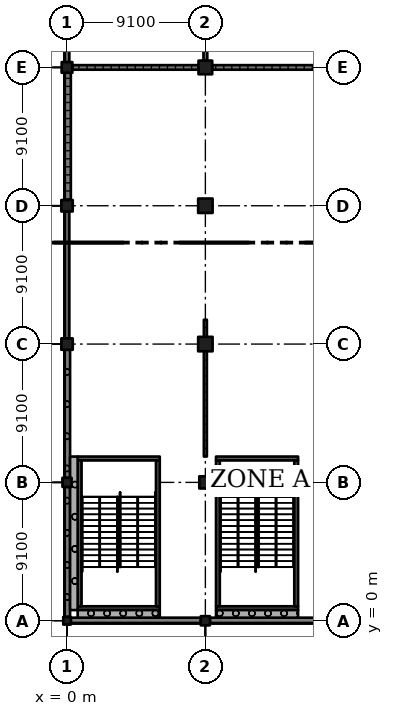
"""IFC4 building model, lengths in metres.
Left out: names, types, materials, properties, quantities, classifications, styles, units other than length and angle.
Written with IfcOpenShell. Run it as: python <this file> out.ifc"""

import sys

from ifc_helpers import new_model, si_unit, direction, frame, frame_2d, origin, origin_2d, place, context, subcontext, project, spatial, rectangle, extrude, element, fill, save


model = new_model("IFC4")
c1 = context("Model", 3, precision=1e-05, world=origin(), true_north=direction((0.0, 1.0)))
c2 = subcontext(c1, "Body", "Model", "MODEL_VIEW")
j1 = project(units=[si_unit("LENGTHUNIT", "METRE"), si_unit("PLANEANGLEUNIT", "RADIAN")], contexts=[c1])
p1 = place(None, origin())
s1 = spatial("IfcSite", under=j1, at=p1, CompositionType="ELEMENT")
p2 = place(p1, origin())
s2 = spatial("IfcBuilding", under=s1, at=p2, CompositionType="ELEMENT")
p3 = place(p2, origin())
s3 = spatial("IfcBuildingStorey", under=s2, at=p3, CompositionType="ELEMENT", Elevation=0.0)
p4 = place(p3, frame((0.0, 0.0, -0.4), z_axis=(0.0, 0.0, 1.0), x_axis=(1.0, 0.0, 0.0)))
e1 = element("IfcColumn", 1, at=p4, inside=s3, PredefinedType="COLUMN", context=c2, shape_type="SweptSolid", body=[
    extrude(rectangle(XDim=0.5, YDim=0.5, at=origin_2d()), origin(), (0.0, 0.0, 1.0), 6.77),
])
p5 = place(p3, frame((0.0, 9.1, -0.4), z_axis=(0.0, 0.0, 1.0), x_axis=(1.0, 0.0, 0.0)))
e2 = element("IfcColumn", 2, at=p5, inside=s3, PredefinedType="COLUMN", context=c2, shape_type="SweptSolid", body=[
    extrude(rectangle(XDim=0.6, YDim=0.6, at=origin_2d()), origin(), (0.0, 0.0, 1.0), 6.77),
])
for number, where, z_axis, x_axis in (
    (3, (0.0, 18.2, -0.4), (0.0, 0.0, 1.0), (1.0, 0.0, 0.0)),
    (4, (0.0, 27.3, -0.4), (0.0, 0.0, 1.0), (1.0, 0.0, 0.0)),
):
    element("IfcColumn", number, at=place(p3, frame(where, z_axis=z_axis, x_axis=x_axis)), inside=s3, PredefinedType="COLUMN", context=c2, shape_type="SweptSolid", body=[
        extrude(rectangle(XDim=0.75, YDim=0.75, at=origin_2d()), origin(), (0.0, 0.0, 1.0), 6.77),
    ])
p6 = place(p3, frame((0.0, 36.4, -0.4), z_axis=(0.0, 0.0, 1.0), x_axis=(1.0, 0.0, 0.0)))
e5 = element("IfcColumn", 5, at=p6, inside=s3, PredefinedType="COLUMN", context=c2, shape_type="SweptSolid", body=[
    extrude(rectangle(XDim=0.7, YDim=0.7, at=origin_2d()), origin(), (0.0, 0.0, 1.0), 6.77),
])
p7 = place(p3, frame((9.1, 0.0, -0.4), z_axis=(0.0, 0.0, 1.0), x_axis=(1.0, 0.0, 0.0)))
e6 = element("IfcColumn", 6, at=p7, inside=s3, PredefinedType="COLUMN", context=c2, shape_type="SweptSolid", body=[
    extrude(rectangle(XDim=0.6, YDim=0.6, at=origin_2d()), origin(), (0.0, 0.0, 1.0), 6.77),
])
p8 = place(p3, frame((9.1, 9.1, -0.4), z_axis=(0.0, 0.0, 1.0), x_axis=(1.0, 0.0, 0.0)))
e7 = element("IfcColumn", 7, at=p8, inside=s3, PredefinedType="COLUMN", context=c2, shape_type="SweptSolid", body=[
    extrude(rectangle(XDim=0.8, YDim=0.8, at=origin_2d()), origin(), (0.0, 0.0, 1.0), 6.77),
])
for number, where, z_axis, x_axis in (
    (8, (9.1, 18.2, -0.4), (0.0, 0.0, 1.0), (1.0, 0.0, 0.0)),
    (9, (9.1, 27.3, -0.4), (0.0, 0.0, 1.0), (1.0, 0.0, 0.0)),
):
    element("IfcColumn", number, at=place(p3, frame(where, z_axis=z_axis, x_axis=x_axis)), inside=s3, PredefinedType="COLUMN", context=c2, shape_type="SweptSolid", body=[
        extrude(rectangle(XDim=0.95, YDim=0.95, at=origin_2d()), origin(), (0.0, 0.0, 1.0), 6.77),
    ])
p9 = place(p3, frame((9.1, 36.4, -0.4), z_axis=(0.0, 0.0, 1.0), x_axis=(1.0, 0.0, 0.0)))
e10 = element("IfcColumn", 10, at=p9, inside=s3, PredefinedType="COLUMN", context=c2, shape_type="SweptSolid", body=[
    extrude(rectangle(XDim=0.9, YDim=0.9, at=origin_2d()), origin(), (0.0, 0.0, 1.0), 6.77),
])
p10 = place(p3, frame((6.1, 0.825, -0.4), z_axis=(0.0, 0.0, 1.0), x_axis=(-1.0, 0.0, 0.0)))
e11 = element("IfcWall", 11, at=p10, inside=s3, PredefinedType="SHEAR", context=c2, shape_type="SweptSolid", body=[
    extrude(rectangle(XDim=5.4, YDim=0.25, at=frame_2d((2.7, 0.0))), origin(), (0.0, 0.0, 1.0), 6.77),
])
p11 = place(p3, frame((6.1, 10.675, -0.4), z_axis=(0.0, 0.0, 1.0), x_axis=(-1.0, 0.0, 0.0)))
e12 = element("IfcWall", 12, at=p11, inside=s3, PredefinedType="SHEAR", context=c2, shape_type="SweptSolid", body=[
    extrude(rectangle(XDim=5.4, YDim=0.25, at=frame_2d((2.7, 0.0))), origin(), (0.0, 0.0, 1.0), 6.77),
])
p12 = place(p11, frame((1.5, 0.0, 0.4)))
e13 = element("IfcOpeningElement", 13, at=p12, cuts=e12, PredefinedType="OPENING", context=c2, shape_type="SweptSolid", body=[
    extrude(rectangle(XDim=2.4, YDim=2.1, at=frame_2d((1.2, 1.05))), frame((0.0, 0.135, 0.0), z_axis=(0.0, -1.0, 0.0), x_axis=(1.0, 0.0, 0.0)), (0.0, 0.0, 1.0), 0.27),
])
p13 = place(p3, frame((0.825, 10.55, -0.4), z_axis=(0.0, 0.0, 1.0), x_axis=(0.0, -1.0, 0.0)))
e14 = element("IfcWall", 14, at=p13, inside=s3, PredefinedType="SHEAR", context=c2, shape_type="SweptSolid", body=[
    extrude(rectangle(XDim=9.6, YDim=0.25, at=frame_2d((4.8, 0.0))), origin(), (0.0, 0.0, 1.0), 6.77),
])
p14 = place(p3, frame((5.975, 10.55, -0.4), z_axis=(0.0, 0.0, 1.0), x_axis=(0.0, -1.0, 0.0)))
e15 = element("IfcWall", 15, at=p14, inside=s3, PredefinedType="SHEAR", context=c2, shape_type="SweptSolid", body=[
    extrude(rectangle(XDim=9.6, YDim=0.25, at=frame_2d((4.8, 0.0))), origin(), (0.0, 0.0, 1.0), 6.77),
])
p15 = place(p14, frame((0.45, 0.0, 0.4)))
e16 = element("IfcOpeningElement", 16, at=p15, cuts=e15, PredefinedType="OPENING", context=c2, shape_type="SweptSolid", body=[
    extrude(rectangle(XDim=1.2, YDim=2.1, at=frame_2d((0.6, 1.05))), frame((0.0, 0.135, 0.0), z_axis=(0.0, -1.0, 0.0), x_axis=(1.0, 0.0, 0.0)), (0.0, 0.0, 1.0), 0.27),
])
p16 = place(p3, frame((15.2, 0.825, -0.4), z_axis=(0.0, 0.0, 1.0), x_axis=(-1.0, 0.0, 0.0)))
e17 = element("IfcWall", 17, at=p16, inside=s3, PredefinedType="SHEAR", context=c2, shape_type="SweptSolid", body=[
    extrude(rectangle(XDim=5.4, YDim=0.25, at=frame_2d((2.7, 0.0))), origin(), (0.0, 0.0, 1.0), 6.77),
])
p17 = place(p3, frame((15.2, 10.675, -0.4), z_axis=(0.0, 0.0, 1.0), x_axis=(-1.0, 0.0, 0.0)))
e18 = element("IfcWall", 18, at=p17, inside=s3, PredefinedType="SHEAR", context=c2, shape_type="SweptSolid", body=[
    extrude(rectangle(XDim=5.4, YDim=0.25, at=frame_2d((2.7, 0.0))), origin(), (0.0, 0.0, 1.0), 6.77),
])
p18 = place(p17, frame((1.5, 0.0, 0.4)))
e19 = element("IfcOpeningElement", 19, at=p18, cuts=e18, PredefinedType="OPENING", context=c2, shape_type="SweptSolid", body=[
    extrude(rectangle(XDim=2.4, YDim=2.1, at=frame_2d((1.2, 1.05))), frame((0.0, 0.135, 0.0), z_axis=(0.0, -1.0, 0.0), x_axis=(1.0, 0.0, 0.0)), (0.0, 0.0, 1.0), 0.27),
])
p19 = place(p3, frame((9.925, 10.55, -0.4), z_axis=(0.0, 0.0, 1.0), x_axis=(0.0, -1.0, 0.0)))
e20 = element("IfcWall", 20, at=p19, inside=s3, PredefinedType="SHEAR", context=c2, shape_type="SweptSolid", body=[
    extrude(rectangle(XDim=9.6, YDim=0.25, at=frame_2d((4.8, 0.0))), origin(), (0.0, 0.0, 1.0), 6.77),
])
p20 = place(p3, frame((15.075, 10.55, -0.4), z_axis=(0.0, 0.0, 1.0), x_axis=(0.0, -1.0, 0.0)))
e21 = element("IfcWall", 21, at=p20, inside=s3, PredefinedType="SHEAR", context=c2, shape_type="SweptSolid", body=[
    extrude(rectangle(XDim=9.6, YDim=0.25, at=frame_2d((4.8, 0.0))), origin(), (0.0, 0.0, 1.0), 6.77),
])
p21 = place(p20, frame((0.45, 0.0, 0.4)))
e22 = element("IfcOpeningElement", 22, at=p21, cuts=e21, PredefinedType="OPENING", context=c2, shape_type="SweptSolid", body=[
    extrude(rectangle(XDim=1.2, YDim=2.1, at=frame_2d((0.6, 1.05))), frame((0.0, 0.135, 0.0), z_axis=(0.0, -1.0, 0.0), x_axis=(1.0, 0.0, 0.0)), (0.0, 0.0, 1.0), 0.27),
])
p22 = place(p3, frame((0.25, 0.025, 0.0), z_axis=(0.0, 0.0, 1.0), x_axis=(1.0, 0.0, 0.0)))
e23 = element("IfcWall", 23, at=p22, inside=s3, PredefinedType="SOLIDWALL", context=c2, shape_type="SweptSolid", body=[
    extrude(rectangle(XDim=8.55, YDim=0.35, at=frame_2d((4.275, 0.0))), origin(), (0.0, 0.0, 1.0), 5.27),
])
p23 = place(p22, frame((6.15, 0.0, 0.0)))
e24 = element("IfcOpeningElement", 24, at=p23, cuts=e23, PredefinedType="OPENING", context=c2, shape_type="SweptSolid", body=[
    extrude(rectangle(XDim=1.8, YDim=2.4, at=frame_2d((0.9, 1.2))), frame((0.0, 0.185, 0.0), z_axis=(0.0, -1.0, 0.0), x_axis=(1.0, 0.0, 0.0)), (0.0, 0.0, 1.0), 0.37),
])
p24 = place(p3, frame((9.4, 0.025, 0.0), z_axis=(0.0, 0.0, 1.0), x_axis=(1.0, 0.0, 0.0)))
e25 = element("IfcWall", 25, at=p24, inside=s3, PredefinedType="SOLIDWALL", context=c2, shape_type="SweptSolid", body=[
    extrude(rectangle(XDim=8.5, YDim=0.35, at=frame_2d((4.25, 0.0))), origin(), (0.0, 0.0, 1.0), 5.27),
])
p25 = place(p24, frame((5.95, 0.0, 0.0)))
e26 = element("IfcOpeningElement", 26, at=p25, cuts=e25, PredefinedType="OPENING", context=c2, shape_type="SweptSolid", body=[
    extrude(rectangle(XDim=2.1, YDim=2.4, at=frame_2d((1.05, 1.2))), frame((0.0, 0.185, 0.0), z_axis=(0.0, -1.0, 0.0), x_axis=(1.0, 0.0, 0.0)), (0.0, 0.0, 1.0), 0.37),
])
p26 = place(p3, frame((0.0, 45.175, 0.0), z_axis=(0.0, 0.0, 1.0), x_axis=(0.0, -1.0, 0.0)))
e27 = element("IfcWall", 27, at=p26, inside=s3, PredefinedType="SOLIDWALL", context=c2, shape_type="SweptSolid", body=[
    extrude(rectangle(XDim=8.425, YDim=0.3, at=frame_2d((4.212, 0.0))), origin(), (0.0, 0.0, 1.0), 5.27),
])
p27 = place(p3, frame((0.05, 36.05, 0.0), z_axis=(0.0, 0.0, 1.0), x_axis=(0.0, -1.0, 0.0)))
e28 = element("IfcWall", 28, at=p27, inside=s3, PredefinedType="SOLIDWALL", context=c2, shape_type="SweptSolid", body=[
    extrude(rectangle(XDim=8.375, YDim=0.4, at=frame_2d((4.188, 0.0))), origin(), (0.0, 0.0, 1.0), 5.32),
])
p28 = place(p27, frame((1.95, 0.0, 0.0)))
e29 = element("IfcOpeningElement", 29, at=p28, cuts=e28, PredefinedType="OPENING", context=c2, shape_type="SweptSolid", body=[
    extrude(rectangle(XDim=4.5, YDim=4.8, at=frame_2d((2.25, 2.4))), frame((0.0, 0.21, 0.0), z_axis=(0.0, -1.0, 0.0), x_axis=(1.0, 0.0, 0.0)), (0.0, 0.0, 1.0), 0.42),
])
p29 = place(p27, frame((0.475, 0.0, 0.0)))
e30 = element("IfcOpeningElement", 30, at=p29, cuts=e28, PredefinedType="OPENING", context=c2, shape_type="SweptSolid", body=[
    extrude(rectangle(XDim=1.0, YDim=2.1, at=frame_2d((0.5, 1.05))), frame((0.0, 0.21, 0.0), z_axis=(0.0, -1.0, 0.0), x_axis=(1.0, 0.0, 0.0)), (0.0, 0.0, 1.0), 0.42),
])
p30 = place(p3, frame((0.0, 26.925, 0.0), z_axis=(0.0, 0.0, 1.0), x_axis=(0.0, -1.0, 0.0)))
e31 = element("IfcWall", 31, at=p30, inside=s3, PredefinedType="SOLIDWALL", context=c2, shape_type="SweptSolid", body=[
    extrude(rectangle(XDim=8.35, YDim=0.3, at=frame_2d((4.175, 0.0))), origin(), (0.0, 0.0, 1.0), 5.32),
])
p31 = place(p3, frame((0.025, 17.825, 0.0), z_axis=(0.0, 0.0, 1.0), x_axis=(0.0, -1.0, 0.0)))
e32 = element("IfcWall", 32, at=p31, inside=s3, PredefinedType="SOLIDWALL", context=c2, shape_type="SweptSolid", body=[
    extrude(rectangle(XDim=8.425, YDim=0.35, at=frame_2d((4.212, 0.0))), origin(), (0.0, 0.0, 1.0), 5.27),
])
p32 = place(p31, frame((4.425, 0.0, 0.0)))
e33 = element("IfcOpeningElement", 33, at=p32, cuts=e32, PredefinedType="OPENING", context=c2, shape_type="SweptSolid", body=[
    extrude(rectangle(XDim=2.4, YDim=2.4, at=frame_2d((1.2, 1.2))), frame((0.0, 0.185, 0.0), z_axis=(0.0, -1.0, 0.0), x_axis=(1.0, 0.0, 0.0)), (0.0, 0.0, 1.0), 0.37),
])
p33 = place(p31, frame((1.425, 0.0, 0.0)))
e34 = element("IfcOpeningElement", 34, at=p33, cuts=e32, PredefinedType="OPENING", context=c2, shape_type="SweptSolid", body=[
    extrude(rectangle(XDim=2.4, YDim=2.4, at=frame_2d((1.2, 1.2))), frame((0.0, 0.185, 0.0), z_axis=(0.0, -1.0, 0.0), x_axis=(1.0, 0.0, 0.0)), (0.0, 0.0, 1.0), 0.37),
])
p34 = place(p3, frame((0.025, 8.8, 0.0), z_axis=(0.0, 0.0, 1.0), x_axis=(0.0, -1.0, 0.0)))
e35 = element("IfcWall", 35, at=p34, inside=s3, PredefinedType="SOLIDWALL", context=c2, shape_type="SweptSolid", body=[
    extrude(rectangle(XDim=8.55, YDim=0.35, at=frame_2d((4.275, 0.0))), origin(), (0.0, 0.0, 1.0), 5.27),
])
p35 = place(p3, frame((0.7, 0.45, 0.0), z_axis=(0.0, 0.0, 1.0), x_axis=(1.0, 0.0, 0.0)))
e36 = element("IfcWall", 36, at=p35, inside=s3, PredefinedType="SOLIDWALL", context=c2, shape_type="SweptSolid", body=[
    extrude(rectangle(XDim=5.4, YDim=0.5, at=frame_2d((2.7, 0.0))), origin(), (0.0, 0.0, 1.0), 6.37),
])
p36 = place(p3, frame((0.45, 0.7, 0.0), z_axis=(0.0, 0.0, 1.0), x_axis=(0.0, 1.0, 0.0)))
e37 = element("IfcWall", 37, at=p36, inside=s3, PredefinedType="SOLIDWALL", context=c2, shape_type="SweptSolid", body=[
    extrude(rectangle(XDim=10.1, YDim=0.5, at=frame_2d((5.05, 0.0))), origin(), (0.0, 0.0, 1.0), 6.02),
])
p37 = place(p3, frame((9.8, 0.45, 0.0), z_axis=(0.0, 0.0, 1.0), x_axis=(1.0, 0.0, 0.0)))
e38 = element("IfcWall", 38, at=p37, inside=s3, PredefinedType="SOLIDWALL", context=c2, shape_type="SweptSolid", body=[
    extrude(rectangle(XDim=5.4, YDim=0.5, at=frame_2d((2.7, 0.0))), origin(), (0.0, 0.0, 1.0), 6.37),
])
p38 = place(p3, frame((0.35, 36.4, 0.0), z_axis=(0.0, 0.0, 1.0), x_axis=(1.0, 0.0, 0.0)))
e39 = element("IfcWall", 39, at=p38, inside=s3, PredefinedType="SOLIDWALL", context=c2, shape_type="SweptSolid", body=[
    extrude(rectangle(XDim=8.3, YDim=0.3, at=frame_2d((4.15, 0.0))), origin(), (0.0, 0.0, 1.0), 5.32),
])
p39 = place(p38, frame((3.65, 0.0, 0.0)))
e40 = element("IfcOpeningElement", 40, at=p39, cuts=e39, PredefinedType="OPENING", context=c2, shape_type="SweptSolid", body=[
    extrude(rectangle(XDim=1.0, YDim=2.1, at=frame_2d((0.5, 1.05))), frame((0.0, 0.16, 0.0), z_axis=(0.0, -1.0, 0.0), x_axis=(1.0, 0.0, 0.0)), (0.0, 0.0, 1.0), 0.32),
])
p40 = place(p3, frame((9.1, 17.725, 0.0), z_axis=(0.0, 0.0, 1.0), x_axis=(0.0, -1.0, 0.0)))
e41 = element("IfcWall", 41, at=p40, inside=s3, PredefinedType="PARTITIONING", context=c2, shape_type="SweptSolid", body=[
    extrude(rectangle(XDim=6.925, YDim=0.2, at=frame_2d((3.462, 0.0))), origin(), (0.0, 0.0, 1.0), 5.32),
])
p41 = place(p40, frame((0.85, 0.0, 0.0)))
e42 = element("IfcOpeningElement", 42, at=p41, cuts=e41, PredefinedType="OPENING", context=c2, shape_type="SweptSolid", body=[
    extrude(rectangle(XDim=1.8, YDim=2.4, at=frame_2d((0.9, 1.2))), frame((0.0, 0.11, 0.0), z_axis=(0.0, -1.0, 0.0), x_axis=(1.0, 0.0, 0.0)), (0.0, 0.0, 1.0), 0.22),
])
p42 = place(p40, frame((4.25, 0.0, 0.0)))
e43 = element("IfcOpeningElement", 43, at=p42, cuts=e41, PredefinedType="OPENING", context=c2, shape_type="SweptSolid", body=[
    extrude(rectangle(XDim=1.8, YDim=2.4, at=frame_2d((0.9, 1.2))), frame((0.0, 0.11, 0.0), z_axis=(0.0, -1.0, 0.0), x_axis=(1.0, 0.0, 0.0)), (0.0, 0.0, 1.0), 0.22),
])
p43 = place(p3, frame((9.1, 19.8, 0.0), z_axis=(0.0, 0.0, 1.0), x_axis=(0.0, -1.0, 0.0)))
e44 = element("IfcWall", 44, at=p43, inside=s3, PredefinedType="PARTITIONING", context=c2, shape_type="SweptSolid", body=[
    extrude(rectangle(XDim=1.125, YDim=0.2, at=frame_2d((0.562, 0.0))), origin(), (0.0, 0.0, 1.0), 5.32),
])
p44 = place(p3, frame((9.1, 40.825, 0.0), z_axis=(0.0, 0.0, 1.0), x_axis=(0.0, -1.0, 0.0)))
e45 = element("IfcWall", 45, at=p44, inside=s3, PredefinedType="SOLIDWALL", context=c2, shape_type="SweptSolid", body=[
    extrude(rectangle(XDim=3.975, YDim=0.25, at=frame_2d((1.987, 0.0))), origin(), (0.0, 0.0, 1.0), 5.32),
])
p45 = place(p3, frame((9.55, 36.4, 0.0), z_axis=(0.0, 0.0, 1.0), x_axis=(1.0, 0.0, 0.0)))
e46 = element("IfcWall", 46, at=p45, inside=s3, PredefinedType="SOLIDWALL", context=c2, shape_type="SweptSolid", body=[
    extrude(rectangle(XDim=8.175, YDim=0.3, at=frame_2d((4.087, 0.0))), origin(), (0.0, 0.0, 1.0), 5.32),
])
p46 = place(p45, frame((3.55, 0.0, 0.0)))
e47 = element("IfcOpeningElement", 47, at=p46, cuts=e46, PredefinedType="OPENING", context=c2, shape_type="SweptSolid", body=[
    extrude(rectangle(XDim=1.0, YDim=2.1, at=frame_2d((0.5, 1.05))), frame((0.0, 0.16, 0.0), z_axis=(0.0, -1.0, 0.0), x_axis=(1.0, 0.0, 0.0)), (0.0, 0.0, 1.0), 0.32),
])
p47 = place(p23, frame((1.8, 0.0, 0.0), z_axis=(0.0, 0.0, 1.0), x_axis=(-1.0, 0.0, 0.0)))
e48 = element("IfcDoor", 48, at=p47, inside=s3, OperationType="DOUBLE_DOOR_SINGLE_SWING", PredefinedType="DOOR", context=c2, shape_type="SweptSolid", body=[
    extrude(rectangle(XDim=1.8, YDim=2.4, at=frame_2d((0.9, 1.2))), frame((0.0, 0.025, 0.0), z_axis=(0.0, -1.0, 0.0), x_axis=(1.0, 0.0, 0.0)), (0.0, 0.0, 1.0), 0.05),
])
fill(e24, e48)
p48 = place(p25, frame((2.1, 0.0, 0.0), z_axis=(0.0, 0.0, 1.0), x_axis=(-1.0, 0.0, 0.0)))
e49 = element("IfcDoor", 49, at=p48, inside=s3, OperationType="DOUBLE_DOOR_SINGLE_SWING", PredefinedType="DOOR", context=c2, shape_type="SweptSolid", body=[
    extrude(rectangle(XDim=2.1, YDim=2.4, at=frame_2d((1.05, 1.2))), frame((0.0, 0.025, 0.0), z_axis=(0.0, -1.0, 0.0), x_axis=(1.0, 0.0, 0.0)), (0.0, 0.0, 1.0), 0.05),
])
fill(e26, e49)
p49 = place(p28, frame((4.5, 0.0, 0.0), z_axis=(0.0, 0.0, 1.0), x_axis=(-1.0, 0.0, 0.0)))
e50 = element("IfcDoor", 50, at=p49, inside=s3, OperationType="ROLLINGUP", PredefinedType="DOOR", context=c2, shape_type="SweptSolid", body=[
    extrude(rectangle(XDim=4.5, YDim=4.8, at=frame_2d((2.25, 2.4))), frame((0.0, 0.025, 0.0), z_axis=(0.0, -1.0, 0.0), x_axis=(1.0, 0.0, 0.0)), (0.0, 0.0, 1.0), 0.05),
])
fill(e29, e50)
p50 = place(p29, frame((1.0, 0.0, 0.0), z_axis=(0.0, 0.0, 1.0), x_axis=(-1.0, 0.0, 0.0)))
e51 = element("IfcDoor", 51, at=p50, inside=s3, OperationType="SINGLE_SWING_LEFT", PredefinedType="DOOR", context=c2, shape_type="SweptSolid", body=[
    extrude(rectangle(XDim=1.0, YDim=2.1, at=frame_2d((0.5, 1.05))), frame((0.0, 0.025, 0.0), z_axis=(0.0, -1.0, 0.0), x_axis=(1.0, 0.0, 0.0)), (0.0, 0.0, 1.0), 0.05),
])
fill(e30, e51)
p51 = place(p32, frame((2.4, 0.0, 0.0), z_axis=(0.0, 0.0, 1.0), x_axis=(-1.0, 0.0, 0.0)))
e52 = element("IfcDoor", 52, at=p51, inside=s3, OperationType="DOUBLE_DOOR_SINGLE_SWING", PredefinedType="DOOR", context=c2, shape_type="SweptSolid", body=[
    extrude(rectangle(XDim=2.4, YDim=2.4, at=frame_2d((1.2, 1.2))), frame((0.0, 0.025, 0.0), z_axis=(0.0, -1.0, 0.0), x_axis=(1.0, 0.0, 0.0)), (0.0, 0.0, 1.0), 0.05),
])
fill(e33, e52)
p52 = place(p33, frame((2.4, 0.0, 0.0), z_axis=(0.0, 0.0, 1.0), x_axis=(-1.0, 0.0, 0.0)))
e53 = element("IfcDoor", 53, at=p52, inside=s3, OperationType="DOUBLE_DOOR_SINGLE_SWING", PredefinedType="DOOR", context=c2, shape_type="SweptSolid", body=[
    extrude(rectangle(XDim=2.4, YDim=2.4, at=frame_2d((1.2, 1.2))), frame((0.0, 0.025, 0.0), z_axis=(0.0, -1.0, 0.0), x_axis=(1.0, 0.0, 0.0)), (0.0, 0.0, 1.0), 0.05),
])
fill(e34, e53)
p53 = place(p39, origin())
e54 = element("IfcDoor", 54, at=p53, inside=s3, OperationType="SINGLE_SWING_RIGHT", PredefinedType="DOOR", context=c2, shape_type="SweptSolid", body=[
    extrude(rectangle(XDim=1.0, YDim=2.1, at=frame_2d((0.5, 1.05))), frame((0.0, 0.025, 0.0), z_axis=(0.0, -1.0, 0.0), x_axis=(1.0, 0.0, 0.0)), (0.0, 0.0, 1.0), 0.05),
])
fill(e40, e54)
p54 = place(p46, origin())
e55 = element("IfcDoor", 55, at=p54, inside=s3, OperationType="SINGLE_SWING_RIGHT", PredefinedType="DOOR", context=c2, shape_type="SweptSolid", body=[
    extrude(rectangle(XDim=1.0, YDim=2.1, at=frame_2d((0.5, 1.05))), frame((0.0, 0.025, 0.0), z_axis=(0.0, -1.0, 0.0), x_axis=(1.0, 0.0, 0.0)), (0.0, 0.0, 1.0), 0.05),
])
fill(e47, e55)
p55 = place(p41, origin())
e56 = element("IfcDoor", 56, at=p55, inside=s3, OperationType="DOUBLE_DOOR_SINGLE_SWING", PredefinedType="DOOR", context=c2, shape_type="SweptSolid", body=[
    extrude(rectangle(XDim=1.8, YDim=2.4, at=frame_2d((0.9, 1.2))), frame((0.0, 0.025, 0.0), z_axis=(0.0, -1.0, 0.0), x_axis=(1.0, 0.0, 0.0)), (0.0, 0.0, 1.0), 0.05),
])
fill(e42, e56)
p56 = place(p42, origin())
e57 = element("IfcDoor", 57, at=p56, inside=s3, OperationType="DOUBLE_DOOR_SINGLE_SWING", PredefinedType="DOOR", context=c2, shape_type="SweptSolid", body=[
    extrude(rectangle(XDim=1.8, YDim=2.4, at=frame_2d((0.9, 1.2))), frame((0.0, 0.025, 0.0), z_axis=(0.0, -1.0, 0.0), x_axis=(1.0, 0.0, 0.0)), (0.0, 0.0, 1.0), 0.05),
])
fill(e43, e57)
p57 = place(p12, origin())
e58 = element("IfcDoor", 58, at=p57, inside=s3, OperationType="DOUBLE_DOOR_SINGLE_SWING", PredefinedType="DOOR", context=c2, shape_type="SweptSolid", body=[
    extrude(rectangle(XDim=2.4, YDim=2.1, at=frame_2d((1.2, 1.05))), frame((0.0, 0.025, 0.0), z_axis=(0.0, -1.0, 0.0), x_axis=(1.0, 0.0, 0.0)), (0.0, 0.0, 1.0), 0.05),
])
fill(e13, e58)
p58 = place(p18, origin())
e59 = element("IfcDoor", 59, at=p58, inside=s3, OperationType="DOUBLE_DOOR_SINGLE_SWING", PredefinedType="DOOR", context=c2, shape_type="SweptSolid", body=[
    extrude(rectangle(XDim=2.4, YDim=2.1, at=frame_2d((1.2, 1.05))), frame((0.0, 0.025, 0.0), z_axis=(0.0, -1.0, 0.0), x_axis=(1.0, 0.0, 0.0)), (0.0, 0.0, 1.0), 0.05),
])
fill(e19, e59)
p59 = place(p15, origin())
e60 = element("IfcDoor", 60, at=p59, inside=s3, OperationType="SINGLE_SWING_RIGHT", PredefinedType="DOOR", context=c2, shape_type="SweptSolid", body=[
    extrude(rectangle(XDim=1.2, YDim=2.1, at=frame_2d((0.6, 1.05))), frame((0.0, 0.025, 0.0), z_axis=(0.0, -1.0, 0.0), x_axis=(1.0, 0.0, 0.0)), (0.0, 0.0, 1.0), 0.05),
])
fill(e16, e60)
p60 = place(p21, origin())
e61 = element("IfcDoor", 61, at=p60, inside=s3, OperationType="SINGLE_SWING_RIGHT", PredefinedType="DOOR", context=c2, shape_type="SweptSolid", body=[
    extrude(rectangle(XDim=1.2, YDim=2.1, at=frame_2d((0.6, 1.05))), frame((0.0, 0.025, 0.0), z_axis=(0.0, -1.0, 0.0), x_axis=(1.0, 0.0, 0.0)), (0.0, 0.0, 1.0), 0.05),
])
fill(e22, e61)
save(model, sys.argv[1])
